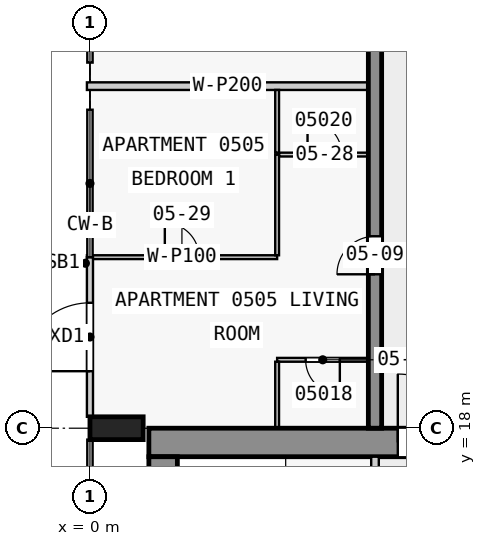
"""IFC4 building model, lengths in metres.
Left out: names, types, materials, properties, quantities, classifications, styles, units other than length and angle.
Written with IfcOpenShell. Run it as: python <this file> out.ifc"""

import sys

from ifc_helpers import new_model, si_unit, direction, frame, frame_2d, origin, origin_2d, place, context, subcontext, project, spatial, rectangle, extrude, element, fill, save


model = new_model("IFC4")
c1 = context("Model", 3, precision=1e-05, world=origin(), true_north=direction((0.0, 1.0)))
c2 = subcontext(c1, "Body", "Model", "MODEL_VIEW")
j1 = project(units=[si_unit("LENGTHUNIT", "METRE"), si_unit("PLANEANGLEUNIT", "RADIAN")], contexts=[c1])
p1 = place(None, origin())
s1 = spatial("IfcSite", under=j1, at=p1, CompositionType="ELEMENT")
p2 = place(p1, origin())
s2 = spatial("IfcBuilding", under=s1, at=p2, CompositionType="ELEMENT")
p3 = place(p2, frame((0.0, 0.0, 26.8)))
s3 = spatial("IfcBuildingStorey", under=s2, at=p3, CompositionType="ELEMENT", Elevation=26.8)
p4 = place(p3, frame((0.7, 18.0, 0.0), z_axis=(0.0, 0.0, 1.0), x_axis=(0.0, 1.0, 0.0)))
e1 = element("IfcColumn", 1, at=p4, inside=s3, PredefinedType="COLUMN", context=c2, shape_type="SweptSolid", body=[
    extrude(rectangle(XDim=0.6, YDim=1.4, at=origin_2d()), origin(), (0.0, 0.0, 1.0), 3.5),
])
p5 = place(p3, frame((1.55, 17.625, 0.0), z_axis=(0.0, 0.0, 1.0), x_axis=(1.0, 0.0, 0.0)))
e2 = element("IfcWall", 2, at=p5, inside=s3, PredefinedType="SHEAR", context=c2, shape_type="SweptSolid", body=[
    extrude(rectangle(XDim=20.95, YDim=0.75, at=frame_2d((10.475, 0.0))), origin(), (0.0, 0.0, 1.0), 3.25),
])
p6 = place(p5, frame((6.55, 0.0, 0.0)))
e3 = element("IfcOpeningElement", 3, at=p6, cuts=e2, PredefinedType="OPENING", context=c2, shape_type="SweptSolid", body=[
    extrude(rectangle(XDim=1.8, YDim=2.1, at=frame_2d((0.9, 1.05))), frame((0.0, 0.385, 0.0), z_axis=(0.0, -1.0, 0.0), x_axis=(1.0, 0.0, 0.0)), (0.0, 0.0, 1.0), 0.77),
])
p7 = place(p3, frame((1.925, 2.5, 0.0), z_axis=(0.0, 0.0, 1.0), x_axis=(0.0, 1.0, 0.0)))
e4 = element("IfcWall", 4, at=p7, inside=s3, PredefinedType="SHEAR", context=c2, shape_type="SweptSolid", body=[
    extrude(rectangle(XDim=14.75, YDim=0.75, at=frame_2d((7.375, 0.0))), origin(), (0.0, 0.0, 1.0), 3.25),
])
p8 = place(p3, frame((7.5, 18.0, 0.0), z_axis=(0.0, 0.0, 1.0), x_axis=(0.0, 1.0, 0.0)))
e5 = element("IfcWall", 5, at=p8, inside=s3, PredefinedType="SHEAR", context=c2, shape_type="SweptSolid", body=[
    extrude(rectangle(XDim=27.0, YDim=0.35, at=frame_2d((13.5, 0.0))), origin(), (0.0, 0.0, 1.0), 3.25),
])
p9 = place(p8, frame((4.05, 0.0, 0.0)))
e6 = element("IfcOpeningElement", 6, at=p9, cuts=e5, PredefinedType="OPENING", context=c2, shape_type="SweptSolid", body=[
    extrude(rectangle(XDim=1.0, YDim=2.1, at=frame_2d((0.5, 1.05))), frame((0.0, 0.185, 0.0), z_axis=(0.0, -1.0, 0.0), x_axis=(1.0, 0.0, 0.0)), (0.0, 0.0, 1.0), 0.37),
])
p10 = place(p8, frame((13.05, 0.0, 0.0)))
e7 = element("IfcOpeningElement", 7, at=p10, cuts=e5, PredefinedType="OPENING", context=c2, shape_type="SweptSolid", body=[
    extrude(rectangle(XDim=1.0, YDim=2.1, at=frame_2d((0.5, 1.05))), frame((0.0, 0.185, 0.0), z_axis=(0.0, -1.0, 0.0), x_axis=(1.0, 0.0, 0.0)), (0.0, 0.0, 1.0), 0.37),
])
p11 = place(p8, frame((21.35, 0.0, 0.0)))
e8 = element("IfcOpeningElement", 8, at=p11, cuts=e5, PredefinedType="OPENING", context=c2, shape_type="SweptSolid", body=[
    extrude(rectangle(XDim=1.0, YDim=2.1, at=frame_2d((0.5, 1.05))), frame((0.0, 0.185, 0.0), z_axis=(0.0, -1.0, 0.0), x_axis=(1.0, 0.0, 0.0)), (0.0, 0.0, 1.0), 0.37),
])
p12 = place(p3, frame((0.0, 18.3, 0.0), z_axis=(0.0, 0.0, 1.0), x_axis=(0.0, 1.0, 0.0)))
e9 = element("IfcWall", 9, at=p12, inside=s3, PredefinedType="STANDARD", context=c2, shape_type="SweptSolid", body=[
    extrude(rectangle(XDim=4.2, YDim=0.16, at=frame_2d((2.1, 0.0))), origin(), (0.0, 0.0, 1.0), 3.25),
])
p13 = place(p12, frame((1.2, 0.0, 0.0)))
e10 = element("IfcOpeningElement", 10, at=p13, cuts=e9, PredefinedType="OPENING", context=c2, shape_type="SweptSolid", body=[
    extrude(rectangle(XDim=1.8, YDim=2.4, at=frame_2d((0.9, 1.2))), frame((0.0, 0.09, 0.0), z_axis=(0.0, -1.0, 0.0), x_axis=(1.0, 0.0, 0.0)), (0.0, 0.0, 1.0), 0.18),
])
p14 = place(p3, frame((7.5, 10.1, 0.0), z_axis=(0.0, 0.0, 1.0), x_axis=(0.0, 1.0, 0.0)))
e11 = element("IfcWall", 11, at=p14, inside=s3, PredefinedType="PARTITIONING", context=c2, shape_type="SweptSolid", body=[
    extrude(rectangle(XDim=7.15, YDim=0.2, at=frame_2d((3.575, 0.0))), origin(), (0.0, 0.0, 1.0), 3.25),
])
p15 = place(p14, frame((1.05, 0.0, 0.0)))
e12 = element("IfcOpeningElement", 12, at=p15, cuts=e11, PredefinedType="OPENING", context=c2, shape_type="SweptSolid", body=[
    extrude(rectangle(XDim=0.9, YDim=2.1, at=frame_2d((0.45, 1.05))), frame((0.0, 0.11, 0.0), z_axis=(0.0, -1.0, 0.0), x_axis=(1.0, 0.0, 0.0)), (0.0, 0.0, 1.0), 0.22),
])
p16 = place(p14, frame((4.625, 0.0, 0.0)))
e13 = element("IfcOpeningElement", 13, at=p16, cuts=e11, PredefinedType="OPENING", context=c2, shape_type="SweptSolid", body=[
    extrude(rectangle(XDim=0.9, YDim=2.1, at=frame_2d((0.45, 1.05))), frame((0.0, 0.11, 0.0), z_axis=(0.0, -1.0, 0.0), x_axis=(1.0, 0.0, 0.0)), (0.0, 0.0, 1.0), 0.22),
])
p17 = place(p3, frame((7.325, 19.8, 0.0), z_axis=(0.0, 0.0, 1.0), x_axis=(-1.0, 0.0, 0.0)))
e14 = element("IfcWall", 14, at=p17, inside=s3, PredefinedType="PARTITIONING", context=c2, shape_type="SweptSolid", body=[
    extrude(rectangle(XDim=2.4, YDim=0.1, at=frame_2d((1.2, 0.0))), origin(), (0.0, 0.0, 1.0), 3.25),
])
p18 = place(p17, frame((0.75, 0.0, 0.0)))
e15 = element("IfcOpeningElement", 15, at=p18, cuts=e14, PredefinedType="OPENING", context=c2, shape_type="SweptSolid", body=[
    extrude(rectangle(XDim=0.9, YDim=2.1, at=frame_2d((0.45, 1.05))), frame((0.0, 0.06, 0.0), z_axis=(0.0, -1.0, 0.0), x_axis=(1.0, 0.0, 0.0)), (0.0, 0.0, 1.0), 0.12),
])
p19 = place(p3, frame((-0.08, 22.5, 0.0), z_axis=(0.0, 0.0, 1.0), x_axis=(1.0, 0.0, 0.0)))
e16 = element("IfcWall", 16, at=p19, inside=s3, PredefinedType="PARTITIONING", context=c2, shape_type="SweptSolid", body=[
    extrude(rectangle(XDim=5.005, YDim=0.1, at=frame_2d((2.502, 0.0))), origin(), (0.0, 0.0, 1.0), 3.25),
])
p20 = place(p19, frame((2.05, 0.0, 0.0)))
e17 = element("IfcOpeningElement", 17, at=p20, cuts=e16, PredefinedType="OPENING", context=c2, shape_type="SweptSolid", body=[
    extrude(rectangle(XDim=0.9, YDim=2.1, at=frame_2d((0.45, 1.05))), frame((0.0, 0.06, 0.0), z_axis=(0.0, -1.0, 0.0), x_axis=(1.0, 0.0, 0.0)), (0.0, 0.0, 1.0), 0.12),
])
p21 = place(p3, frame((4.975, 25.2, 0.0), z_axis=(0.0, 0.0, 1.0), x_axis=(1.0, 0.0, 0.0)))
e18 = element("IfcWall", 18, at=p21, inside=s3, PredefinedType="PARTITIONING", context=c2, shape_type="SweptSolid", body=[
    extrude(rectangle(XDim=2.35, YDim=0.1, at=frame_2d((1.175, 0.0))), origin(), (0.0, 0.0, 1.0), 3.25),
])
p22 = place(p21, frame((0.75, 0.0, 0.0)))
e19 = element("IfcOpeningElement", 19, at=p22, cuts=e18, PredefinedType="OPENING", context=c2, shape_type="SweptSolid", body=[
    extrude(rectangle(XDim=0.9, YDim=2.1, at=frame_2d((0.45, 1.05))), frame((0.0, 0.06, 0.0), z_axis=(0.0, -1.0, 0.0), x_axis=(1.0, 0.0, 0.0)), (0.0, 0.0, 1.0), 0.12),
])
p23 = place(p3, frame((7.325, 27.0, 0.0), z_axis=(0.0, 0.0, 1.0), x_axis=(-1.0, 0.0, 0.0)))
e20 = element("IfcWall", 20, at=p23, inside=s3, PredefinedType="PARTITIONING", context=c2, shape_type="SweptSolid", body=[
    extrude(rectangle(XDim=7.405, YDim=0.2, at=frame_2d((3.703, 0.0))), origin(), (0.0, 0.0, 1.0), 3.25),
])
p24 = place(p3, frame((4.925, 19.75, 0.0), z_axis=(0.0, 0.0, 1.0), x_axis=(0.0, -1.0, 0.0)))
e21 = element("IfcWall", 21, at=p24, inside=s3, PredefinedType="PARTITIONING", context=c2, shape_type="SweptSolid", body=[
    extrude(rectangle(XDim=1.75, YDim=0.1, at=frame_2d((0.875, 0.0))), origin(), (0.0, 0.0, 1.0), 3.25),
])
p25 = place(p3, frame((4.925, 26.9, 0.0), z_axis=(0.0, 0.0, 1.0), x_axis=(0.0, -1.0, 0.0)))
e22 = element("IfcWall", 22, at=p25, inside=s3, PredefinedType="PARTITIONING", context=c2, shape_type="SweptSolid", body=[
    extrude(rectangle(XDim=1.65, YDim=0.1, at=frame_2d((0.825, 0.0))), origin(), (0.0, 0.0, 1.0), 3.25),
])
p26 = place(p3, frame((4.925, 22.55, 0.0), z_axis=(0.0, 0.0, 1.0), x_axis=(0.0, 1.0, 0.0)))
e23 = element("IfcWall", 23, at=p26, inside=s3, PredefinedType="PARTITIONING", context=c2, shape_type="SweptSolid", body=[
    extrude(rectangle(XDim=2.65, YDim=0.1, at=frame_2d((1.325, 0.0))), origin(), (0.0, 0.0, 1.0), 3.25),
])
p27 = place(p13, origin())
e24 = element("IfcDoor", 24, at=p27, inside=s3, OperationType="SINGLE_SWING_LEFT", PredefinedType="DOOR", context=c2, shape_type="SweptSolid", body=[
    extrude(rectangle(XDim=1.8, YDim=2.4, at=frame_2d((0.9, 1.2))), frame((0.0, 0.025, 0.0), z_axis=(0.0, -1.0, 0.0), x_axis=(1.0, 0.0, 0.0)), (0.0, 0.0, 1.0), 0.05),
])
fill(e10, e24)
p28 = place(p6, origin())
e25 = element("IfcDoor", 25, at=p28, inside=s3, OperationType="DOUBLE_DOOR_SINGLE_SWING", PredefinedType="DOOR", context=c2, shape_type="SweptSolid", body=[
    extrude(rectangle(XDim=1.8, YDim=2.1, at=frame_2d((0.9, 1.05))), frame((0.0, 0.025, 0.0), z_axis=(0.0, -1.0, 0.0), x_axis=(1.0, 0.0, 0.0)), (0.0, 0.0, 1.0), 0.05),
])
fill(e3, e25)
p29 = place(p9, origin())
e26 = element("IfcDoor", 26, at=p29, inside=s3, OperationType="SINGLE_SWING_LEFT", PredefinedType="DOOR", context=c2, shape_type="SweptSolid", body=[
    extrude(rectangle(XDim=1.0, YDim=2.1, at=frame_2d((0.5, 1.05))), frame((0.0, 0.025, 0.0), z_axis=(0.0, -1.0, 0.0), x_axis=(1.0, 0.0, 0.0)), (0.0, 0.0, 1.0), 0.05),
])
fill(e6, e26)
p30 = place(p18, origin())
e27 = element("IfcDoor", 27, at=p30, inside=s3, OperationType="SINGLE_SWING_LEFT", PredefinedType="DOOR", context=c2, shape_type="SweptSolid", body=[
    extrude(rectangle(XDim=0.9, YDim=2.1, at=frame_2d((0.45, 1.05))), frame((0.0, 0.025, 0.0), z_axis=(0.0, -1.0, 0.0), x_axis=(1.0, 0.0, 0.0)), (0.0, 0.0, 1.0), 0.05),
])
fill(e15, e27)
p31 = place(p22, origin())
e28 = element("IfcDoor", 28, at=p31, inside=s3, OperationType="SINGLE_SWING_RIGHT", PredefinedType="DOOR", context=c2, shape_type="SweptSolid", body=[
    extrude(rectangle(XDim=0.9, YDim=2.1, at=frame_2d((0.45, 1.05))), frame((0.0, 0.025, 0.0), z_axis=(0.0, -1.0, 0.0), x_axis=(1.0, 0.0, 0.0)), (0.0, 0.0, 1.0), 0.05),
])
fill(e19, e28)
p32 = place(p20, origin())
e29 = element("IfcDoor", 29, at=p32, inside=s3, OperationType="SINGLE_SWING_LEFT", PredefinedType="DOOR", context=c2, shape_type="SweptSolid", body=[
    extrude(rectangle(XDim=0.9, YDim=2.1, at=frame_2d((0.45, 1.05))), frame((0.0, 0.025, 0.0), z_axis=(0.0, -1.0, 0.0), x_axis=(1.0, 0.0, 0.0)), (0.0, 0.0, 1.0), 0.05),
])
fill(e17, e29)
save(model, sys.argv[1])
